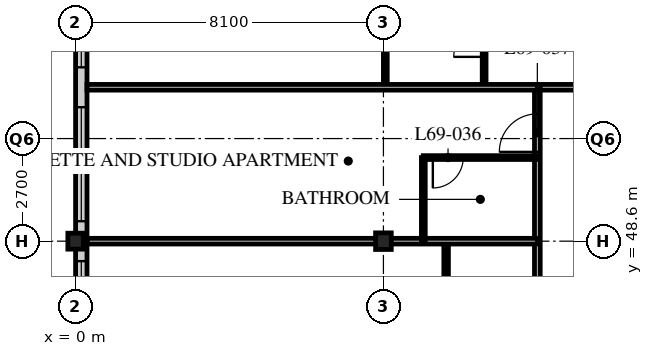
"""IFC4 building model, lengths in metres.
Left out: names, types, materials, properties, quantities, classifications, styles, units other than length and angle.
Written with IfcOpenShell. Run it as: python <this file> out.ifc"""

import sys

from ifc_helpers import new_model, si_unit, direction, frame, frame_2d, origin, origin_2d, place, context, subcontext, project, spatial, rectangle, i_section, extrude, element, fill, save


model = new_model("IFC4")
c1 = context("Model", 3, precision=1e-05, world=origin(), true_north=direction((0.0, 1.0)))
c2 = subcontext(c1, "Body", "Model", "MODEL_VIEW")
j1 = project(units=[si_unit("LENGTHUNIT", "METRE"), si_unit("PLANEANGLEUNIT", "RADIAN")], contexts=[c1])
p1 = place(None, origin())
s1 = spatial("IfcSite", under=j1, at=p1, CompositionType="ELEMENT")
p2 = place(p1, origin())
s2 = spatial("IfcBuilding", under=s1, at=p2, CompositionType="ELEMENT")
p3 = place(p2, frame((0.0, 0.0, 269.7)))
s3 = spatial("IfcBuildingStorey", under=s2, at=p3, CompositionType="ELEMENT", Elevation=269.7)
p4 = place(p3, frame((0.0, 48.6, 0.0), z_axis=(0.0, 0.0, 1.0), x_axis=(1.0, 0.0, 0.0)))
e1 = element("IfcColumn", 1, at=p4, inside=s3, PredefinedType="COLUMN", context=c2, shape_type="SweptSolid", body=[
    extrude(i_section(OverallWidth=0.407, OverallDepth=0.419, WebThickness=0.031, FlangeThickness=0.049, FilletRadius=0.015, at=origin_2d()), origin(), (0.0, 0.0, 1.0), 3.9),
])
p5 = place(p3, frame((8.1, 48.6, 0.0), z_axis=(0.0, 0.0, 1.0), x_axis=(1.0, 0.0, 0.0)))
e2 = element("IfcColumn", 2, at=p5, inside=s3, PredefinedType="COLUMN", context=c2, shape_type="SweptSolid", body=[
    extrude(i_section(OverallWidth=0.412, OverallDepth=0.437, WebThickness=0.036, FlangeThickness=0.058, FilletRadius=0.015, at=origin_2d()), origin(), (0.0, 0.0, 1.0), 3.9),
])
p6 = place(p3, frame((0.15, 56.4, 0.0), z_axis=(0.0, 0.0, 1.0), x_axis=(0.0, -1.0, 0.0)))
e3 = element("IfcWall", 3, at=p6, inside=s3, PredefinedType="SOLIDWALL", context=c2, shape_type="SweptSolid", body=[
    extrude(rectangle(XDim=32.1, YDim=0.3, at=frame_2d((16.05, 0.0))), origin(), (0.0, 0.0, 1.0), 3.69),
])
p7 = place(p6, frame((0.225, 0.0, 0.6)))
e4 = element("IfcOpeningElement", 4, at=p7, cuts=e3, PredefinedType="OPENING", context=c2, shape_type="SweptSolid", body=[
    extrude(rectangle(XDim=3.0, YDim=2.4, at=frame_2d((1.5, 1.2))), frame((0.0, 0.16, 0.0), z_axis=(0.0, -1.0, 0.0), x_axis=(1.0, 0.0, 0.0)), (0.0, 0.0, 1.0), 0.32),
])
p8 = place(p6, frame((4.275, 0.0, 0.6)))
e5 = element("IfcOpeningElement", 5, at=p8, cuts=e3, PredefinedType="OPENING", context=c2, shape_type="SweptSolid", body=[
    extrude(rectangle(XDim=3.0, YDim=2.4, at=frame_2d((1.5, 1.2))), frame((0.0, 0.16, 0.0), z_axis=(0.0, -1.0, 0.0), x_axis=(1.0, 0.0, 0.0)), (0.0, 0.0, 1.0), 0.32),
])
p9 = place(p6, frame((8.325, 0.0, 0.6)))
e6 = element("IfcOpeningElement", 6, at=p9, cuts=e3, PredefinedType="OPENING", context=c2, shape_type="SweptSolid", body=[
    extrude(rectangle(XDim=3.0, YDim=2.4, at=frame_2d((1.5, 1.2))), frame((0.0, 0.16, 0.0), z_axis=(0.0, -1.0, 0.0), x_axis=(1.0, 0.0, 0.0)), (0.0, 0.0, 1.0), 0.32),
])
p10 = place(p6, frame((12.375, 0.0, 0.6)))
e7 = element("IfcOpeningElement", 7, at=p10, cuts=e3, PredefinedType="OPENING", context=c2, shape_type="SweptSolid", body=[
    extrude(rectangle(XDim=3.0, YDim=2.4, at=frame_2d((1.5, 1.2))), frame((0.0, 0.16, 0.0), z_axis=(0.0, -1.0, 0.0), x_axis=(1.0, 0.0, 0.0)), (0.0, 0.0, 1.0), 0.32),
])
p11 = place(p6, frame((16.425, 0.0, 0.6)))
e8 = element("IfcOpeningElement", 8, at=p11, cuts=e3, PredefinedType="OPENING", context=c2, shape_type="SweptSolid", body=[
    extrude(rectangle(XDim=3.0, YDim=2.4, at=frame_2d((1.5, 1.2))), frame((0.0, 0.16, 0.0), z_axis=(0.0, -1.0, 0.0), x_axis=(1.0, 0.0, 0.0)), (0.0, 0.0, 1.0), 0.32),
])
p12 = place(p6, frame((20.475, 0.0, 0.6)))
e9 = element("IfcOpeningElement", 9, at=p12, cuts=e3, PredefinedType="OPENING", context=c2, shape_type="SweptSolid", body=[
    extrude(rectangle(XDim=3.0, YDim=2.4, at=frame_2d((1.5, 1.2))), frame((0.0, 0.16, 0.0), z_axis=(0.0, -1.0, 0.0), x_axis=(1.0, 0.0, 0.0)), (0.0, 0.0, 1.0), 0.32),
])
p13 = place(p6, frame((24.525, 0.0, 0.6)))
e10 = element("IfcOpeningElement", 10, at=p13, cuts=e3, PredefinedType="OPENING", context=c2, shape_type="SweptSolid", body=[
    extrude(rectangle(XDim=3.0, YDim=2.4, at=frame_2d((1.5, 1.2))), frame((0.0, 0.16, 0.0), z_axis=(0.0, -1.0, 0.0), x_axis=(1.0, 0.0, 0.0)), (0.0, 0.0, 1.0), 0.32),
])
p14 = place(p6, frame((28.575, 0.0, 0.6)))
e11 = element("IfcOpeningElement", 11, at=p14, cuts=e3, PredefinedType="OPENING", context=c2, shape_type="SweptSolid", body=[
    extrude(rectangle(XDim=3.0, YDim=2.4, at=frame_2d((1.5, 1.2))), frame((0.0, 0.16, 0.0), z_axis=(0.0, -1.0, 0.0), x_axis=(1.0, 0.0, 0.0)), (0.0, 0.0, 1.0), 0.32),
])
p15 = place(p3, frame((12.15, 52.65, 0.0), z_axis=(0.0, 0.0, 1.0), x_axis=(1.0, 0.0, 0.0)))
e12 = element("IfcWall", 12, at=p15, inside=s3, PredefinedType="PARTITIONING", context=c2, shape_type="SweptSolid", body=[
    extrude(rectangle(XDim=24.3, YDim=0.15, at=frame_2d((12.15, 0.0))), origin(), (0.0, 0.0, 1.0), 3.69),
])
p16 = place(p15, frame((6.4, 0.0, 0.0)))
e13 = element("IfcOpeningElement", 13, at=p16, cuts=e12, PredefinedType="OPENING", context=c2, shape_type="SweptSolid", body=[
    extrude(rectangle(XDim=1.0, YDim=2.1, at=frame_2d((0.5, 1.05))), frame((0.0, 0.085, 0.0), z_axis=(0.0, -1.0, 0.0), x_axis=(1.0, 0.0, 0.0)), (0.0, 0.0, 1.0), 0.17),
])
p17 = place(p15, frame((8.5, 0.0, 0.0)))
e14 = element("IfcOpeningElement", 14, at=p17, cuts=e12, PredefinedType="OPENING", context=c2, shape_type="SweptSolid", body=[
    extrude(rectangle(XDim=1.0, YDim=2.1, at=frame_2d((0.5, 1.05))), frame((0.0, 0.085, 0.0), z_axis=(0.0, -1.0, 0.0), x_axis=(1.0, 0.0, 0.0)), (0.0, 0.0, 1.0), 0.17),
])
p18 = place(p15, frame((16.6, 0.0, 0.0)))
e15 = element("IfcOpeningElement", 15, at=p18, cuts=e12, PredefinedType="OPENING", context=c2, shape_type="SweptSolid", body=[
    extrude(rectangle(XDim=1.0, YDim=2.1, at=frame_2d((0.5, 1.05))), frame((0.0, 0.085, 0.0), z_axis=(0.0, -1.0, 0.0), x_axis=(1.0, 0.0, 0.0)), (0.0, 0.0, 1.0), 0.17),
])
p19 = place(p15, frame((1.525, 0.0, 0.0)))
e16 = element("IfcOpeningElement", 16, at=p19, cuts=e12, PredefinedType="OPENING", context=c2, shape_type="SweptSolid", body=[
    extrude(rectangle(XDim=1.0, YDim=2.1, at=frame_2d((0.5, 1.05))), frame((0.0, 0.085, 0.0), z_axis=(0.0, -1.0, 0.0), x_axis=(1.0, 0.0, 0.0)), (0.0, 0.0, 1.0), 0.17),
])
p20 = place(p3, frame((12.15, 22.5, 0.0), z_axis=(0.0, 0.0, 1.0), x_axis=(0.0, 1.0, 0.0)))
e17 = element("IfcWall", 17, at=p20, inside=s3, PredefinedType="PARTITIONING", context=c2, shape_type="SweptSolid", body=[
    extrude(rectangle(XDim=30.15, YDim=0.15, at=frame_2d((15.075, 0.0))), origin(), (0.0, 0.0, 1.0), 3.69),
])
p21 = place(p20, frame((0.4, 0.0, 0.0)))
e18 = element("IfcOpeningElement", 18, at=p21, cuts=e17, PredefinedType="OPENING", context=c2, shape_type="SweptSolid", body=[
    extrude(rectangle(XDim=1.0, YDim=2.1, at=frame_2d((0.5, 1.05))), frame((0.0, 0.085, 0.0), z_axis=(0.0, -1.0, 0.0), x_axis=(1.0, 0.0, 0.0)), (0.0, 0.0, 1.0), 0.17),
])
p22 = place(p20, frame((18.4, 0.0, 0.0)))
e19 = element("IfcOpeningElement", 19, at=p22, cuts=e17, PredefinedType="OPENING", context=c2, shape_type="SweptSolid", body=[
    extrude(rectangle(XDim=1.0, YDim=2.1, at=frame_2d((0.5, 1.05))), frame((0.0, 0.085, 0.0), z_axis=(0.0, -1.0, 0.0), x_axis=(1.0, 0.0, 0.0)), (0.0, 0.0, 1.0), 0.17),
])
p23 = place(p20, frame((28.45, 0.0, 0.0)))
e20 = element("IfcOpeningElement", 20, at=p23, cuts=e17, PredefinedType="OPENING", context=c2, shape_type="SweptSolid", body=[
    extrude(rectangle(XDim=1.0, YDim=2.1, at=frame_2d((0.5, 1.05))), frame((0.0, 0.085, 0.0), z_axis=(0.0, -1.0, 0.0), x_axis=(1.0, 0.0, 0.0)), (0.0, 0.0, 1.0), 0.17),
])
p24 = place(p3, frame((9.75, 22.5, 0.0), z_axis=(0.0, 0.0, 1.0), x_axis=(0.0, 1.0, 0.0)))
e21 = element("IfcWall", 21, at=p24, inside=s3, PredefinedType="PARTITIONING", context=c2, shape_type="SweptSolid", body=[
    extrude(rectangle(XDim=26.1, YDim=0.12, at=frame_2d((13.05, 0.0))), origin(), (0.0, 0.0, 1.0), 3.69),
])
p25 = place(p24, frame((0.975, 0.0, 0.0)))
e22 = element("IfcOpeningElement", 22, at=p25, cuts=e21, PredefinedType="OPENING", context=c2, shape_type="SweptSolid", body=[
    extrude(rectangle(XDim=0.85, YDim=2.1, at=frame_2d((0.425, 1.05))), frame((0.0, 0.07, 0.0), z_axis=(0.0, -1.0, 0.0), x_axis=(1.0, 0.0, 0.0)), (0.0, 0.0, 1.0), 0.14),
])
p26 = place(p24, frame((10.225, 0.0, 0.0)))
e23 = element("IfcOpeningElement", 23, at=p26, cuts=e21, PredefinedType="OPENING", context=c2, shape_type="SweptSolid", body=[
    extrude(rectangle(XDim=0.85, YDim=2.1, at=frame_2d((0.425, 1.05))), frame((0.0, 0.07, 0.0), z_axis=(0.0, -1.0, 0.0), x_axis=(1.0, 0.0, 0.0)), (0.0, 0.0, 1.0), 0.14),
])
p27 = place(p24, frame((14.275, 0.0, 0.0)))
e24 = element("IfcOpeningElement", 24, at=p27, cuts=e21, PredefinedType="OPENING", context=c2, shape_type="SweptSolid", body=[
    extrude(rectangle(XDim=0.85, YDim=2.1, at=frame_2d((0.425, 1.05))), frame((0.0, 0.07, 0.0), z_axis=(0.0, -1.0, 0.0), x_axis=(1.0, 0.0, 0.0)), (0.0, 0.0, 1.0), 0.14),
])
p28 = place(p24, frame((18.975, 0.0, 0.0)))
e25 = element("IfcOpeningElement", 25, at=p28, cuts=e21, PredefinedType="OPENING", context=c2, shape_type="SweptSolid", body=[
    extrude(rectangle(XDim=0.85, YDim=2.1, at=frame_2d((0.425, 1.05))), frame((0.0, 0.07, 0.0), z_axis=(0.0, -1.0, 0.0), x_axis=(1.0, 0.0, 0.0)), (0.0, 0.0, 1.0), 0.14),
])
p29 = place(p24, frame((22.375, 0.0, 0.0)))
e26 = element("IfcOpeningElement", 26, at=p29, cuts=e21, PredefinedType="OPENING", context=c2, shape_type="SweptSolid", body=[
    extrude(rectangle(XDim=0.85, YDim=2.1, at=frame_2d((0.425, 1.05))), frame((0.0, 0.07, 0.0), z_axis=(0.0, -1.0, 0.0), x_axis=(1.0, 0.0, 0.0)), (0.0, 0.0, 1.0), 0.14),
])
p30 = place(p3, frame((12.15, 48.6, 0.0), z_axis=(0.0, 0.0, 1.0), x_axis=(-1.0, 0.0, 0.0)))
e27 = element("IfcWall", 27, at=p30, inside=s3, PredefinedType="PARTITIONING", context=c2, shape_type="SweptSolid", body=[
    extrude(rectangle(XDim=11.85, YDim=0.15, at=frame_2d((5.925, 0.0))), origin(), (0.0, 0.0, 1.0), 3.078),
])
p31 = place(p3, frame((9.15, 48.6, 0.0), z_axis=(0.0, 0.0, 1.0), x_axis=(0.0, 1.0, 0.0)))
e28 = element("IfcWall", 28, at=p31, inside=s3, PredefinedType="PARTITIONING", context=c2, shape_type="SweptSolid", body=[
    extrude(rectangle(XDim=2.2, YDim=0.1, at=frame_2d((1.1, 0.0))), origin(), (0.0, 0.0, 1.0), 3.69),
])
p32 = place(p3, frame((12.15, 50.8, 0.0), z_axis=(0.0, 0.0, 1.0), x_axis=(-1.0, 0.0, 0.0)))
e29 = element("IfcWall", 29, at=p32, inside=s3, PredefinedType="PARTITIONING", context=c2, shape_type="SweptSolid", body=[
    extrude(rectangle(XDim=3.0, YDim=0.1, at=frame_2d((1.5, 0.0))), origin(), (0.0, 0.0, 1.0), 3.69),
])
p33 = place(p32, frame((1.95, 0.0, 0.0)))
e30 = element("IfcOpeningElement", 30, at=p33, cuts=e29, PredefinedType="OPENING", context=c2, shape_type="SweptSolid", body=[
    extrude(rectangle(XDim=0.8, YDim=2.1, at=frame_2d((0.4, 1.05))), frame((0.0, 0.06, 0.0), z_axis=(0.0, -1.0, 0.0), x_axis=(1.0, 0.0, 0.0)), (0.0, 0.0, 1.0), 0.12),
])
p34 = place(p3, frame((10.75, 52.65, 0.0), z_axis=(0.0, 0.0, 1.0), x_axis=(0.0, 1.0, 0.0)))
e31 = element("IfcWall", 31, at=p34, inside=s3, PredefinedType="PARTITIONING", context=c2, shape_type="SweptSolid", body=[
    extrude(rectangle(XDim=2.4, YDim=0.1, at=frame_2d((1.2, 0.0))), origin(), (0.0, 0.0, 1.0), 3.69),
])
p35 = place(p34, frame((0.8, 0.0, 0.0)))
e32 = element("IfcOpeningElement", 32, at=p35, cuts=e31, PredefinedType="OPENING", context=c2, shape_type="SweptSolid", body=[
    extrude(rectangle(XDim=0.8, YDim=2.1, at=frame_2d((0.4, 1.05))), frame((0.0, 0.06, 0.0), z_axis=(0.0, -1.0, 0.0), x_axis=(1.0, 0.0, 0.0)), (0.0, 0.0, 1.0), 0.12),
])
p36 = place(p3, frame((8.15, 52.65, 0.0), z_axis=(0.0, 0.0, 1.0), x_axis=(0.0, 1.0, 0.0)))
e33 = element("IfcWall", 33, at=p36, inside=s3, PredefinedType="PARTITIONING", context=c2, shape_type="SweptSolid", body=[
    extrude(rectangle(XDim=2.4, YDim=0.1, at=frame_2d((1.2, 0.0))), origin(), (0.0, 0.0, 1.0), 3.078),
])
p37 = place(p3, frame((0.3, 52.65, 0.0), z_axis=(0.0, 0.0, 1.0), x_axis=(1.0, 0.0, 0.0)))
e34 = element("IfcWall", 34, at=p37, inside=s3, PredefinedType="PARTITIONING", context=c2, shape_type="SweptSolid", body=[
    extrude(rectangle(XDim=11.85, YDim=0.15, at=frame_2d((5.925, 0.0))), origin(), (0.0, 0.0, 1.0), 3.69),
])
p38 = place(p7, origin())
e35 = element("IfcWindow", 35, at=p38, inside=s3, PartitioningType="SINGLE_PANEL", PredefinedType="WINDOW", context=c2, shape_type="SweptSolid", body=[
    extrude(rectangle(XDim=3.0, YDim=2.4, at=frame_2d((1.5, 1.2))), frame((0.0, 0.03, 0.0), z_axis=(0.0, -1.0, 0.0), x_axis=(1.0, 0.0, 0.0)), (0.0, 0.0, 1.0), 0.06),
])
fill(e4, e35)
p39 = place(p8, origin())
e36 = element("IfcWindow", 36, at=p39, inside=s3, PartitioningType="SINGLE_PANEL", PredefinedType="WINDOW", context=c2, shape_type="SweptSolid", body=[
    extrude(rectangle(XDim=3.0, YDim=2.4, at=frame_2d((1.5, 1.2))), frame((0.0, 0.03, 0.0), z_axis=(0.0, -1.0, 0.0), x_axis=(1.0, 0.0, 0.0)), (0.0, 0.0, 1.0), 0.06),
])
fill(e5, e36)
p40 = place(p9, origin())
e37 = element("IfcWindow", 37, at=p40, inside=s3, PartitioningType="SINGLE_PANEL", PredefinedType="WINDOW", context=c2, shape_type="SweptSolid", body=[
    extrude(rectangle(XDim=3.0, YDim=2.4, at=frame_2d((1.5, 1.2))), frame((0.0, 0.03, 0.0), z_axis=(0.0, -1.0, 0.0), x_axis=(1.0, 0.0, 0.0)), (0.0, 0.0, 1.0), 0.06),
])
fill(e6, e37)
p41 = place(p33, origin())
e38 = element("IfcDoor", 38, at=p41, inside=s3, OperationType="SINGLE_SWING_RIGHT", PredefinedType="DOOR", context=c2, shape_type="SweptSolid", body=[
    extrude(rectangle(XDim=0.8, YDim=2.1, at=frame_2d((0.4, 1.05))), frame((0.0, 0.025, 0.0), z_axis=(0.0, -1.0, 0.0), x_axis=(1.0, 0.0, 0.0)), (0.0, 0.0, 1.0), 0.05),
])
fill(e30, e38)
p42 = place(p23, origin())
e39 = element("IfcDoor", 39, at=p42, inside=s3, OperationType="SINGLE_SWING_LEFT", PredefinedType="DOOR", context=c2, shape_type="SweptSolid", body=[
    extrude(rectangle(XDim=1.0, YDim=2.1, at=frame_2d((0.5, 1.05))), frame((0.0, 0.025, 0.0), z_axis=(0.0, -1.0, 0.0), x_axis=(1.0, 0.0, 0.0)), (0.0, 0.0, 1.0), 0.05),
])
fill(e20, e39)
p43 = place(p35, origin())
e40 = element("IfcDoor", 40, at=p43, inside=s3, OperationType="SINGLE_SWING_LEFT", PredefinedType="DOOR", context=c2, shape_type="SweptSolid", body=[
    extrude(rectangle(XDim=0.8, YDim=2.1, at=frame_2d((0.4, 1.05))), frame((0.0, 0.025, 0.0), z_axis=(0.0, -1.0, 0.0), x_axis=(1.0, 0.0, 0.0)), (0.0, 0.0, 1.0), 0.05),
])
fill(e32, e40)
save(model, sys.argv[1])
